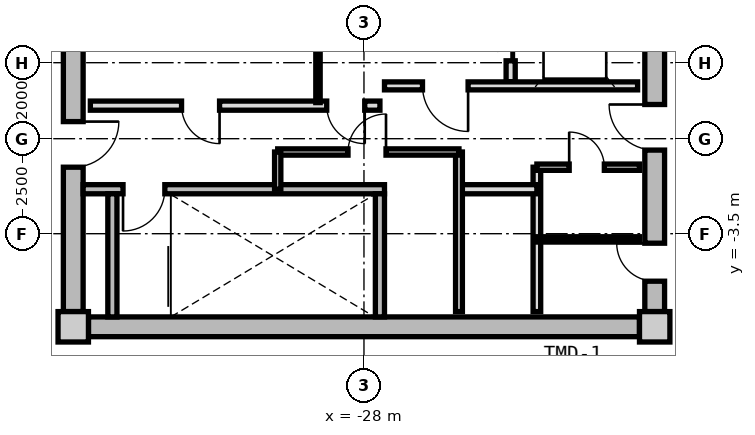
"""IFC4 building model, lengths in metres.
Left out: names, types, materials, properties, quantities, classifications, styles, units other than length and angle.
Written with IfcOpenShell. Run it as: python <this file> out.ifc"""

import sys

from ifc_helpers import new_model, si_unit, direction, frame, frame_2d, origin, origin_2d, place, context, subcontext, project, spatial, rectangle, extrude, source, transform, mapped, element, fill, save


model = new_model("IFC4")
c1 = context("Model", 3, precision=1e-05, world=origin(), true_north=direction((0.0, 1.0)))
c2 = subcontext(c1, "Body", "Model", "MODEL_VIEW")
j1 = project(units=[si_unit("LENGTHUNIT", "METRE"), si_unit("PLANEANGLEUNIT", "RADIAN")], contexts=[c1])
p1 = place(None, origin())
s1 = spatial("IfcSite", under=j1, at=p1, CompositionType="ELEMENT")
p2 = place(p1, origin())
s2 = spatial("IfcBuilding", under=s1, at=p2, CompositionType="ELEMENT")
p3 = place(p2, frame((0.0, 0.0, 244.4)))
s3 = spatial("IfcBuildingStorey", under=s2, at=p3, CompositionType="ELEMENT", Elevation=244.4)
m1 = source(origin(), c2, "Body", "SweptSolid", [
    extrude(rectangle(XDim=0.8, YDim=0.8, at=origin_2d()), origin(), (0.0, 0.0, 1.0), 5.45),
])
for number, where, z_axis, x_axis in (
    (1, (-35.65, -5.95, 0.0), (0.0, 0.0, 1.0), (1.0, 0.0, 0.0)),
    (2, (-20.35, -5.95, 0.0), (0.0, 0.0, 1.0), (1.0, 0.0, 0.0)),
):
    element("IfcColumn", number, at=place(p3, frame(where, z_axis=z_axis, x_axis=x_axis)), inside=s3, PredefinedType="COLUMN", context=c2, shape_type="MappedRepresentation", body=[
        mapped(m1, transform((0.0, 0.0, 0.0), x_axis=(1.0, 0.0, 0.0), y_axis=(0.0, 1.0, 0.0), z_axis=(0.0, 0.0, 1.0), scale=1.0)),
    ])
m2 = source(origin(), c2, "Body", "SweptSolid", [
    extrude(rectangle(XDim=14.5, YDim=0.52, at=frame_2d((7.25, 0.0))), origin(), (0.0, 0.0, 1.0), 5.175),
])
p4 = place(p3, frame((-20.75, -5.95, 0.0), z_axis=(0.0, 0.0, 1.0), x_axis=(-1.0, 0.0, 0.0)))
e3 = element("IfcWall", 3, at=p4, inside=s3, PredefinedType="SHEAR", context=c2, shape_type="MappedRepresentation", body=[
    mapped(m2, transform((0.0, 0.0, 0.0), x_axis=(1.0, 0.0, 0.0), y_axis=(0.0, 1.0, 0.0), z_axis=(0.0, 0.0, 1.0), scale=1.0)),
])
m3 = source(origin(), c2, "Body", "SweptSolid", [
    extrude(rectangle(XDim=11.1, YDim=0.52, at=frame_2d((5.55, 0.0))), origin(), (0.0, 0.0, 1.0), 5.175),
])
p5 = place(p3, frame((-35.65, -5.55, 0.0), z_axis=(0.0, 0.0, 1.0), x_axis=(0.0, 1.0, 0.0)))
e4 = element("IfcWall", 4, at=p5, inside=s3, PredefinedType="SHEAR", context=c2, shape_type="MappedRepresentation", body=[
    mapped(m3, transform((0.0, 0.0, 0.0), x_axis=(1.0, 0.0, 0.0), y_axis=(0.0, 1.0, 0.0), z_axis=(0.0, 0.0, 1.0), scale=1.0)),
])
p6 = place(p5, frame((3.8, 0.0, 0.0)))
e5 = element("IfcOpeningElement", 5, at=p6, cuts=e4, PredefinedType="OPENING", context=c2, shape_type="SweptSolid", body=[
    extrude(rectangle(XDim=1.2, YDim=2.15, at=frame_2d((0.6, 1.075))), frame((0.0, 0.27, 0.0), z_axis=(0.0, -1.0, 0.0), x_axis=(1.0, 0.0, 0.0)), (0.0, 0.0, 1.0), 0.54),
])
p7 = place(p3, frame((-20.35, 5.55, 0.0), z_axis=(0.0, 0.0, 1.0), x_axis=(0.0, -1.0, 0.0)))
e6 = element("IfcWall", 6, at=p7, inside=s3, PredefinedType="SHEAR", context=c2, shape_type="MappedRepresentation", body=[
    mapped(m3, transform((0.0, 0.0, 0.0), x_axis=(1.0, 0.0, 0.0), y_axis=(0.0, 1.0, 0.0), z_axis=(0.0, 0.0, 1.0), scale=1.0)),
])
p8 = place(p7, frame((5.65, 0.0, 0.0)))
e7 = element("IfcOpeningElement", 7, at=p8, cuts=e6, PredefinedType="OPENING", context=c2, shape_type="SweptSolid", body=[
    extrude(rectangle(XDim=1.2, YDim=2.15, at=frame_2d((0.6, 1.075))), frame((0.0, 0.27, 0.0), z_axis=(0.0, -1.0, 0.0), x_axis=(1.0, 0.0, 0.0)), (0.0, 0.0, 1.0), 0.54),
])
p9 = place(p7, frame((9.3, 0.0, 0.0)))
e8 = element("IfcOpeningElement", 8, at=p9, cuts=e6, PredefinedType="OPENING", context=c2, shape_type="SweptSolid", body=[
    extrude(rectangle(XDim=1.0, YDim=2.1, at=frame_2d((0.5, 1.05))), frame((0.0, 0.27, 0.0), z_axis=(0.0, -1.0, 0.0), x_axis=(1.0, 0.0, 0.0)), (0.0, 0.0, 1.0), 0.54),
])
m4 = source(origin(), c2, "Body", "SweptSolid", [
    extrude(rectangle(XDim=7.93, YDim=0.24, at=frame_2d((3.965, 0.0))), origin(), (0.0, 0.0, 1.0), 5.175),
])
p10 = place(p3, frame((-35.39, -2.33, 0.0), z_axis=(0.0, 0.0, 1.0), x_axis=(1.0, 0.0, 0.0)))
e9 = element("IfcWall", 9, at=p10, inside=s3, PredefinedType="PARTITIONING", context=c2, shape_type="MappedRepresentation", body=[
    mapped(m4, transform((0.0, 0.0, 0.0), x_axis=(1.0, 0.0, 0.0), y_axis=(0.0, 1.0, 0.0), z_axis=(0.0, 0.0, 1.0), scale=1.0)),
])
p11 = place(p10, frame((1.05, 0.0, 0.0)))
e10 = element("IfcOpeningElement", 10, at=p11, cuts=e9, PredefinedType="OPENING", context=c2, shape_type="SweptSolid", body=[
    extrude(rectangle(XDim=1.1, YDim=2.15, at=frame_2d((0.55, 1.075))), frame((0.0, 0.13, 0.0), z_axis=(0.0, -1.0, 0.0), x_axis=(1.0, 0.0, 0.0)), (0.0, 0.0, 1.0), 0.26),
])
m5 = source(origin(), c2, "Body", "SweptSolid", [
    extrude(rectangle(XDim=3.24, YDim=0.24, at=frame_2d((1.62, 0.0))), origin(), (0.0, 0.0, 1.0), 5.175),
])
for number, where, z_axis, x_axis in (
    (11, (-34.62, -5.69, 0.0), (0.0, 0.0, 1.0), (0.0, 1.0, 0.0)),
    (12, (-27.58, -5.69, 0.0), (0.0, 0.0, 1.0), (0.0, 1.0, 0.0)),
):
    element("IfcWall", number, at=place(p3, frame(where, z_axis=z_axis, x_axis=x_axis)), inside=s3, PredefinedType="PARTITIONING", context=c2, shape_type="MappedRepresentation", body=[
        mapped(m5, transform((0.0, 0.0, 0.0), x_axis=(1.0, 0.0, 0.0), y_axis=(0.0, 1.0, 0.0), z_axis=(0.0, 0.0, 1.0), scale=1.0)),
    ])
m6 = source(origin(), c2, "Body", "SweptSolid", [
    extrude(rectangle(XDim=5.0, YDim=0.24, at=frame_2d((2.5, 0.0))), origin(), (0.0, 0.0, 1.0), 5.16),
])
p12 = place(p3, frame((-24.14, 0.5, 0.0), z_axis=(0.0, 0.0, 1.0), x_axis=(0.0, 1.0, 0.0)))
e13 = element("IfcWall", 13, at=p12, inside=s3, PredefinedType="PARTITIONING", context=c2, shape_type="MappedRepresentation", body=[
    mapped(m6, transform((0.0, 0.0, 0.0), x_axis=(1.0, 0.0, 0.0), y_axis=(0.0, 1.0, 0.0), z_axis=(0.0, 0.0, 1.0), scale=1.0)),
])
p13 = place(p12, frame((3.05, 0.0, 0.0)))
e14 = element("IfcOpeningElement", 14, at=p13, cuts=e13, PredefinedType="OPENING", context=c2, shape_type="SweptSolid", body=[
    extrude(rectangle(XDim=1.3, YDim=2.2, at=frame_2d((0.65, 1.1))), frame((0.0, 0.13, 0.0), z_axis=(0.0, -1.0, 0.0), x_axis=(1.0, 0.0, 0.0)), (0.0, 0.0, 1.0), 0.26),
])
p14 = place(p12, frame((0.55, 0.0, 0.0)))
e15 = element("IfcOpeningElement", 15, at=p14, cuts=e13, PredefinedType="OPENING", context=c2, shape_type="SweptSolid", body=[
    extrude(rectangle(XDim=1.3, YDim=2.2, at=frame_2d((0.65, 1.1))), frame((0.0, 0.13, 0.0), z_axis=(0.0, -1.0, 0.0), x_axis=(1.0, 0.0, 0.0)), (0.0, 0.0, 1.0), 0.26),
])
m7 = source(origin(), c2, "Body", "SweptSolid", [
    extrude(rectangle(XDim=6.66, YDim=0.21, at=frame_2d((3.33, 0.0))), origin(), (0.0, 0.0, 1.0), 5.16),
])
p15 = place(p3, frame((-27.46, 0.39, 0.0), z_axis=(0.0, 0.0, 1.0), x_axis=(1.0, 0.0, 0.0)))
e16 = element("IfcWall", 16, at=p15, inside=s3, PredefinedType="PARTITIONING", context=c2, shape_type="MappedRepresentation", body=[
    mapped(m7, transform((0.0, 0.0, 0.0), x_axis=(1.0, 0.0, 0.0), y_axis=(0.0, 1.0, 0.0), z_axis=(0.0, 0.0, 1.0), scale=1.0)),
])
p16 = place(p15, frame((1.0, 0.0, 0.0)))
e17 = element("IfcOpeningElement", 17, at=p16, cuts=e16, PredefinedType="OPENING", context=c2, shape_type="SweptSolid", body=[
    extrude(rectangle(XDim=1.2, YDim=2.15, at=frame_2d((0.6, 1.075))), frame((0.0, 0.115, 0.0), z_axis=(0.0, -1.0, 0.0), x_axis=(1.0, 0.0, 0.0)), (0.0, 0.0, 1.0), 0.23),
])
m8 = source(origin(), c2, "Body", "SweptSolid", [
    extrude(rectangle(XDim=7.62, YDim=0.24, at=frame_2d((3.81, 0.0))), origin(), (0.0, 0.0, 1.0), 5.16),
])
p17 = place(p3, frame((-35.2, -0.13, 0.0), z_axis=(0.0, 0.0, 1.0), x_axis=(1.0, 0.0, 0.0)))
e18 = element("IfcWall", 18, at=p17, inside=s3, PredefinedType="PARTITIONING", context=c2, shape_type="MappedRepresentation", body=[
    mapped(m8, transform((0.0, 0.0, 0.0), x_axis=(1.0, 0.0, 0.0), y_axis=(0.0, 1.0, 0.0), z_axis=(0.0, 0.0, 1.0), scale=1.0)),
])
p18 = place(p17, frame((6.22, 0.0, 0.0)))
e19 = element("IfcOpeningElement", 19, at=p18, cuts=e18, PredefinedType="OPENING", context=c2, shape_type="SweptSolid", body=[
    extrude(rectangle(XDim=1.0, YDim=2.1, at=frame_2d((0.5, 1.05))), frame((0.0, 0.13, 0.0), z_axis=(0.0, -1.0, 0.0), x_axis=(1.0, 0.0, 0.0)), (0.0, 0.0, 1.0), 0.26),
])
p19 = place(p17, frame((2.4, 0.0, 0.0)))
e20 = element("IfcOpeningElement", 20, at=p19, cuts=e18, PredefinedType="OPENING", context=c2, shape_type="SweptSolid", body=[
    extrude(rectangle(XDim=1.0, YDim=2.1, at=frame_2d((0.5, 1.05))), frame((0.0, 0.13, 0.0), z_axis=(0.0, -1.0, 0.0), x_axis=(1.0, 0.0, 0.0)), (0.0, 0.0, 1.0), 0.26),
])
m9 = source(origin(), c2, "Body", "SweptSolid", [
    extrude(rectangle(XDim=2.33, YDim=0.115, at=frame_2d((1.165, 0.0))), origin(), (0.0, 0.0, 1.0), 5.16),
])
p20 = place(p3, frame((-29.21, -0.05, 0.0), z_axis=(0.0, 0.0, 1.0), x_axis=(0.0, 1.0, 0.0)))
e21 = element("IfcWall", 21, at=p20, inside=s3, PredefinedType="PARTITIONING", context=c2, shape_type="MappedRepresentation", body=[
    mapped(m9, transform((0.0, 0.0, 0.0), x_axis=(1.0, 0.0, 0.0), y_axis=(0.0, 1.0, 0.0), z_axis=(0.0, 0.0, 1.0), scale=1.0)),
])
m10 = source(origin(), c2, "Body", "SweptSolid", [
    extrude(rectangle(XDim=3.8, YDim=0.2, at=frame_2d((1.9, 0.0))), origin(), (0.0, 0.0, 1.0), 5.16),
])
p21 = place(p3, frame((-23.45, -5.55, 0.0), z_axis=(0.0, 0.0, 1.0), x_axis=(0.0, 1.0, 0.0)))
e22 = element("IfcWall", 22, at=p21, inside=s3, PredefinedType="PARTITIONING", context=c2, shape_type="MappedRepresentation", body=[
    mapped(m10, transform((0.0, 0.0, 0.0), x_axis=(1.0, 0.0, 0.0), y_axis=(0.0, 1.0, 0.0), z_axis=(0.0, 0.0, 1.0), scale=1.0)),
])
m11 = source(origin(), c2, "Body", "SweptSolid", [
    extrude(rectangle(XDim=2.05, YDim=0.24, at=frame_2d((1.025, 0.0))), origin(), (0.0, 0.0, 1.0), 5.16),
])
p22 = place(p3, frame((-25.5, -2.33, 0.0), z_axis=(0.0, 0.0, 1.0), x_axis=(1.0, 0.0, 0.0)))
e23 = element("IfcWall", 23, at=p22, inside=s3, PredefinedType="PARTITIONING", context=c2, shape_type="MappedRepresentation", body=[
    mapped(m11, transform((0.0, 0.0, 0.0), x_axis=(1.0, 0.0, 0.0), y_axis=(0.0, 1.0, 0.0), z_axis=(0.0, 0.0, 1.0), scale=1.0)),
])
m12 = source(origin(), c2, "Body", "SweptSolid", [
    extrude(rectangle(XDim=4.2, YDim=0.18, at=frame_2d((2.1, 0.0))), origin(), (0.0, 0.0, 1.0), 5.16),
])
p23 = place(p3, frame((-25.5, -5.55, 0.0), z_axis=(0.0, 0.0, 1.0), x_axis=(0.0, 1.0, 0.0)))
e24 = element("IfcWall", 24, at=p23, inside=s3, PredefinedType="PARTITIONING", context=c2, shape_type="MappedRepresentation", body=[
    mapped(m12, transform((0.0, 0.0, 0.0), x_axis=(1.0, 0.0, 0.0), y_axis=(0.0, 1.0, 0.0), z_axis=(0.0, 0.0, 1.0), scale=1.0)),
])
m13 = source(origin(), c2, "Body", "SweptSolid", [
    extrude(rectangle(XDim=4.77, YDim=0.165, at=frame_2d((2.385, 0.0))), origin(), (0.0, 0.0, 1.0), 5.16),
])
p24 = place(p3, frame((-30.27, -1.35, 0.0), z_axis=(0.0, 0.0, 1.0), x_axis=(1.0, 0.0, 0.0)))
e25 = element("IfcWall", 25, at=p24, inside=s3, PredefinedType="PARTITIONING", context=c2, shape_type="MappedRepresentation", body=[
    mapped(m13, transform((0.0, 0.0, 0.0), x_axis=(1.0, 0.0, 0.0), y_axis=(0.0, 1.0, 0.0), z_axis=(0.0, 0.0, 1.0), scale=1.0)),
])
p25 = place(p24, frame((1.85, 0.0, 0.0)))
e26 = element("IfcOpeningElement", 26, at=p25, cuts=e25, PredefinedType="OPENING", context=c2, shape_type="SweptSolid", body=[
    extrude(rectangle(XDim=1.0, YDim=2.1, at=frame_2d((0.5, 1.05))), frame((0.0, 0.093, 0.0), z_axis=(0.0, -1.0, 0.0), x_axis=(1.0, 0.0, 0.0)), (0.0, 0.0, 1.0), 0.185),
])
m14 = source(origin(), c2, "Body", "SweptSolid", [
    extrude(rectangle(XDim=0.98, YDim=0.165, at=frame_2d((0.49, 0.0))), origin(), (0.0, 0.0, 1.0), 5.16),
])
p26 = place(p3, frame((-30.27, -2.33, 0.0), z_axis=(0.0, 0.0, 1.0), x_axis=(0.0, 1.0, 0.0)))
e27 = element("IfcWall", 27, at=p26, inside=s3, PredefinedType="PARTITIONING", context=c2, shape_type="MappedRepresentation", body=[
    mapped(m14, transform((0.0, 0.0, 0.0), x_axis=(1.0, 0.0, 0.0), y_axis=(0.0, 1.0, 0.0), z_axis=(0.0, 0.0, 1.0), scale=1.0)),
])
m15 = source(origin(), c2, "Body", "SweptSolid", [
    extrude(rectangle(XDim=2.7, YDim=0.165, at=frame_2d((1.35, 0.0))), origin(), (0.0, 0.0, 1.0), 5.16),
])
p27 = place(p3, frame((-23.45, -1.75, 0.0), z_axis=(0.0, 0.0, 1.0), x_axis=(1.0, 0.0, 0.0)))
e28 = element("IfcWall", 28, at=p27, inside=s3, PredefinedType="PARTITIONING", context=c2, shape_type="MappedRepresentation", body=[
    mapped(m15, transform((0.0, 0.0, 0.0), x_axis=(1.0, 0.0, 0.0), y_axis=(0.0, 1.0, 0.0), z_axis=(0.0, 0.0, 1.0), scale=1.0)),
])
p28 = place(p27, frame((0.85, 0.0, 0.0)))
e29 = element("IfcOpeningElement", 29, at=p28, cuts=e28, PredefinedType="OPENING", context=c2, shape_type="SweptSolid", body=[
    extrude(rectangle(XDim=0.925, YDim=2.1, at=frame_2d((0.462, 1.05))), frame((0.0, 0.093, 0.0), z_axis=(0.0, -1.0, 0.0), x_axis=(1.0, 0.0, 0.0)), (0.0, 0.0, 1.0), 0.185),
])
m16 = source(origin(), c2, "Body", "SweptSolid", [
    extrude(rectangle(XDim=2.7, YDim=0.14, at=frame_2d((1.35, 0.0))), origin(), (0.0, 0.0, 1.0), 5.16),
])
p29 = place(p3, frame((-23.45, -3.65, 0.0), z_axis=(0.0, 0.0, 1.0), x_axis=(1.0, 0.0, 0.0)))
e30 = element("IfcWall", 30, at=p29, inside=s3, PredefinedType="PARTITIONING", context=c2, shape_type="MappedRepresentation", body=[
    mapped(m16, transform((0.0, 0.0, 0.0), x_axis=(1.0, 0.0, 0.0), y_axis=(0.0, 1.0, 0.0), z_axis=(0.0, 0.0, 1.0), scale=1.0)),
])
m17 = source(origin(), c2, "Body", "SweptSolid", [
    extrude(rectangle(XDim=1.1, YDim=2.15, at=frame_2d((0.55, 1.075))), frame((0.0, 0.025, 0.0), z_axis=(0.0, -1.0, 0.0), x_axis=(1.0, 0.0, 0.0)), (0.0, 0.0, 1.0), 0.05),
])
p30 = place(p11, frame((1.1, 0.0, 0.0), z_axis=(0.0, 0.0, 1.0), x_axis=(-1.0, 0.0, 0.0)))
e31 = element("IfcDoor", 31, at=p30, inside=s3, OperationType="SINGLE_SWING_RIGHT", PredefinedType="DOOR", context=c2, shape_type="MappedRepresentation", body=[
    mapped(m17, transform((0.0, 0.0, 0.0), x_axis=(1.0, 0.0, 0.0), y_axis=(0.0, 1.0, 0.0), z_axis=(0.0, 0.0, 1.0), scale=1.0)),
])
fill(e10, e31)
m18 = source(origin(), c2, "Body", "SweptSolid", [
    extrude(rectangle(XDim=1.3, YDim=2.2, at=frame_2d((0.65, 1.1))), frame((0.0, 0.025, 0.0), z_axis=(0.0, -1.0, 0.0), x_axis=(1.0, 0.0, 0.0)), (0.0, 0.0, 1.0), 0.05),
])
p31 = place(p14, origin())
e32 = element("IfcDoor", 32, at=p31, inside=s3, OperationType="SLIDING_TO_RIGHT", PredefinedType="DOOR", context=c2, shape_type="MappedRepresentation", body=[
    mapped(m18, transform((0.0, 0.0, 0.0), x_axis=(1.0, 0.0, 0.0), y_axis=(0.0, 1.0, 0.0), z_axis=(0.0, 0.0, 1.0), scale=1.0)),
])
fill(e15, e32)
m19 = source(origin(), c2, "Body", "SweptSolid", [
    extrude(rectangle(XDim=1.2, YDim=2.15, at=frame_2d((0.6, 1.075))), frame((0.0, 0.025, 0.0), z_axis=(0.0, -1.0, 0.0), x_axis=(1.0, 0.0, 0.0)), (0.0, 0.0, 1.0), 0.05),
])
p32 = place(p16, frame((1.2, 0.0, 0.0), z_axis=(0.0, 0.0, 1.0), x_axis=(-1.0, 0.0, 0.0)))
e33 = element("IfcDoor", 33, at=p32, inside=s3, OperationType="SINGLE_SWING_LEFT", PredefinedType="DOOR", context=c2, shape_type="MappedRepresentation", body=[
    mapped(m19, transform((0.0, 0.0, 0.0), x_axis=(1.0, 0.0, 0.0), y_axis=(0.0, 1.0, 0.0), z_axis=(0.0, 0.0, 1.0), scale=1.0)),
])
fill(e17, e33)
p33 = place(p6, frame((1.2, 0.0, 0.0), z_axis=(0.0, 0.0, 1.0), x_axis=(-1.0, 0.0, 0.0)))
e34 = element("IfcDoor", 34, at=p33, inside=s3, OperationType="SINGLE_SWING_LEFT", PredefinedType="DOOR", context=c2, shape_type="MappedRepresentation", body=[
    mapped(m19, transform((0.0, 0.0, 0.0), x_axis=(1.0, 0.0, 0.0), y_axis=(0.0, 1.0, 0.0), z_axis=(0.0, 0.0, 1.0), scale=1.0)),
])
fill(e5, e34)
p34 = place(p8, frame((1.2, 0.0, 0.0), z_axis=(0.0, 0.0, 1.0), x_axis=(-1.0, 0.0, 0.0)))
e35 = element("IfcDoor", 35, at=p34, inside=s3, OperationType="SINGLE_SWING_RIGHT", PredefinedType="DOOR", context=c2, shape_type="MappedRepresentation", body=[
    mapped(m19, transform((0.0, 0.0, 0.0), x_axis=(1.0, 0.0, 0.0), y_axis=(0.0, 1.0, 0.0), z_axis=(0.0, 0.0, 1.0), scale=1.0)),
])
fill(e7, e35)
m20 = source(origin(), c2, "Body", "SweptSolid", [
    extrude(rectangle(XDim=1.0, YDim=2.1, at=frame_2d((0.5, 1.05))), frame((0.0, 0.025, 0.0), z_axis=(0.0, -1.0, 0.0), x_axis=(1.0, 0.0, 0.0)), (0.0, 0.0, 1.0), 0.05),
])
p35 = place(p18, frame((1.0, 0.0, 0.0), z_axis=(0.0, 0.0, 1.0), x_axis=(-1.0, 0.0, 0.0)))
e36 = element("IfcDoor", 36, at=p35, inside=s3, OperationType="SINGLE_SWING_LEFT", PredefinedType="DOOR", context=c2, shape_type="MappedRepresentation", body=[
    mapped(m20, transform((0.0, 0.0, 0.0), x_axis=(1.0, 0.0, 0.0), y_axis=(0.0, 1.0, 0.0), z_axis=(0.0, 0.0, 1.0), scale=1.0)),
])
fill(e19, e36)
p36 = place(p19, frame((1.0, 0.0, 0.0), z_axis=(0.0, 0.0, 1.0), x_axis=(-1.0, 0.0, 0.0)))
e37 = element("IfcDoor", 37, at=p36, inside=s3, OperationType="SINGLE_SWING_LEFT", PredefinedType="DOOR", context=c2, shape_type="MappedRepresentation", body=[
    mapped(m20, transform((0.0, 0.0, 0.0), x_axis=(1.0, 0.0, 0.0), y_axis=(0.0, 1.0, 0.0), z_axis=(0.0, 0.0, 1.0), scale=1.0)),
])
fill(e20, e37)
p37 = place(p25, origin())
e38 = element("IfcDoor", 38, at=p37, inside=s3, OperationType="SINGLE_SWING_RIGHT", PredefinedType="DOOR", context=c2, shape_type="MappedRepresentation", body=[
    mapped(m20, transform((0.0, 0.0, 0.0), x_axis=(1.0, 0.0, 0.0), y_axis=(0.0, 1.0, 0.0), z_axis=(0.0, 0.0, 1.0), scale=1.0)),
])
fill(e26, e38)
m21 = source(origin(), c2, "Body", "SweptSolid", [
    extrude(rectangle(XDim=0.925, YDim=2.1, at=frame_2d((0.462, 1.05))), frame((0.0, 0.025, 0.0), z_axis=(0.0, -1.0, 0.0), x_axis=(1.0, 0.0, 0.0)), (0.0, 0.0, 1.0), 0.05),
])
p38 = place(p28, origin())
e39 = element("IfcDoor", 39, at=p38, inside=s3, OperationType="SINGLE_SWING_LEFT", PredefinedType="DOOR", context=c2, shape_type="MappedRepresentation", body=[
    mapped(m21, transform((0.0, 0.0, 0.0), x_axis=(1.0, 0.0, 0.0), y_axis=(0.0, 1.0, 0.0), z_axis=(0.0, 0.0, 1.0), scale=1.0)),
])
fill(e29, e39)
p39 = place(p9, frame((1.0, 0.0, 0.0), z_axis=(0.0, 0.0, 1.0), x_axis=(-1.0, 0.0, 0.0)))
e40 = element("IfcDoor", 40, at=p39, inside=s3, OperationType="SINGLE_SWING_RIGHT", PredefinedType="DOOR", context=c2, shape_type="MappedRepresentation", body=[
    mapped(m20, transform((0.0, 0.0, 0.0), x_axis=(1.0, 0.0, 0.0), y_axis=(0.0, 1.0, 0.0), z_axis=(0.0, 0.0, 1.0), scale=1.0)),
])
fill(e8, e40)
save(model, sys.argv[1])
